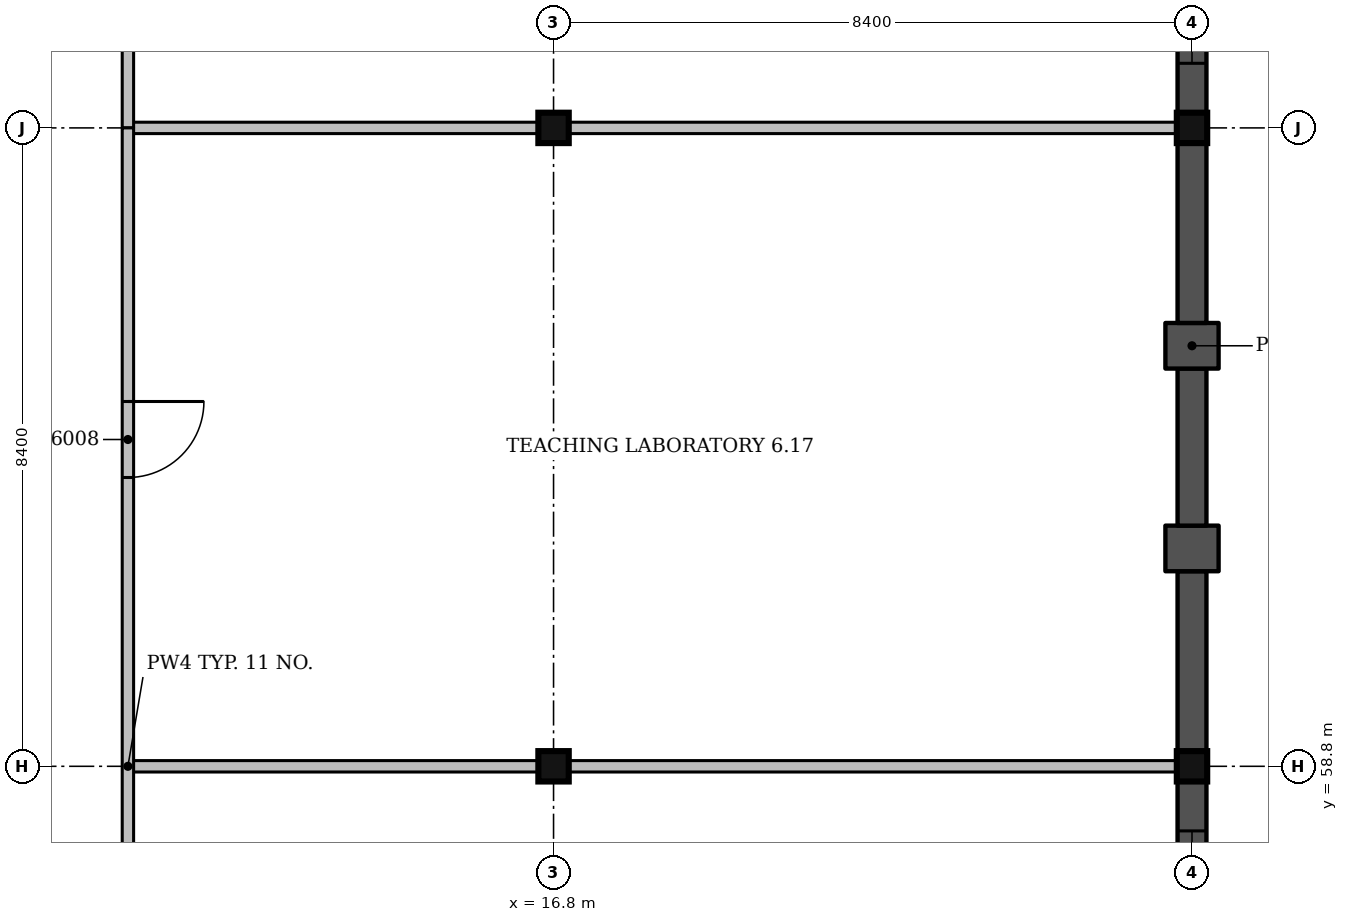
"""IFC4 building model, lengths in metres.
Left out: names, types, materials, properties, quantities, classifications, styles, units other than length and angle.
Written with IfcOpenShell. Run it as: python <this file> out.ifc"""

import sys

from ifc_helpers import new_model, si_unit, direction, frame, frame_2d, origin, origin_2d, place, context, subcontext, project, spatial, rectangle, extrude, element, fill, save


model = new_model("IFC4")
c1 = context("Model", 3, precision=1e-05, world=origin(), true_north=direction((0.0, 1.0)))
c2 = subcontext(c1, "Body", "Model", "MODEL_VIEW")
j1 = project(units=[si_unit("LENGTHUNIT", "METRE"), si_unit("PLANEANGLEUNIT", "RADIAN")], contexts=[c1])
p1 = place(None, origin())
s1 = spatial("IfcSite", under=j1, at=p1, CompositionType="ELEMENT")
p2 = place(p1, origin())
s2 = spatial("IfcBuilding", under=s1, at=p2, CompositionType="ELEMENT")
p3 = place(p2, frame((0.0, 0.0, 27.0)))
s3 = spatial("IfcBuildingStorey", under=s2, at=p3, CompositionType="ELEMENT", Elevation=27.0)
for number, where, z_axis, x_axis in (
    (1, (16.8, 58.8, 0.0), (0.0, 0.0, 1.0), (1.0, 0.0, 0.0)),
    (2, (16.8, 67.2, 0.0), (0.0, 0.0, 1.0), (1.0, 0.0, 0.0)),
    (3, (25.2, 58.8, 0.0), (0.0, 0.0, 1.0), (1.0, 0.0, 0.0)),
    (4, (25.2, 67.2, 0.0), (0.0, 0.0, 1.0), (1.0, 0.0, 0.0)),
):
    element("IfcColumn", number, at=place(p3, frame(where, z_axis=z_axis, x_axis=x_axis)), inside=s3, PredefinedType="COLUMN", context=c2, shape_type="SweptSolid", body=[
        extrude(rectangle(XDim=0.4, YDim=0.4, at=origin_2d()), origin(), (0.0, 0.0, 1.0), 4.5),
    ])
p4 = place(p3, frame((25.2, 54.9, 0.0), z_axis=(0.0, 0.0, 1.0), x_axis=(0.0, 1.0, 0.0)))
e5 = element("IfcWall", 5, at=p4, inside=s3, PredefinedType="SOLIDWALL", context=c2, shape_type="SweptSolid", body=[
    extrude(rectangle(XDim=3.7, YDim=0.38, at=frame_2d((1.85, 0.0))), origin(), (0.0, 0.0, 1.0), 4.2),
])
p5 = place(p4, frame((0.65, 0.0, 1.2)))
e6 = element("IfcOpeningElement", 6, at=p5, cuts=e5, PredefinedType="OPENING", context=c2, shape_type="SweptSolid", body=[
    extrude(rectangle(XDim=2.4, YDim=1.5, at=frame_2d((1.2, 0.75))), frame((0.0, 0.2, 0.0), z_axis=(0.0, -1.0, 0.0), x_axis=(1.0, 0.0, 0.0)), (0.0, 0.0, 1.0), 0.4),
])
p6 = place(p3, frame((25.2, 59.0, 0.0), z_axis=(0.0, 0.0, 1.0), x_axis=(0.0, 1.0, 0.0)))
e7 = element("IfcWall", 7, at=p6, inside=s3, PredefinedType="SOLIDWALL", context=c2, shape_type="SweptSolid", body=[
    extrude(rectangle(XDim=2.367, YDim=0.38, at=frame_2d((1.183, 0.0))), origin(), (0.0, 0.0, 1.0), 3.35),
])
p7 = place(p3, frame((25.2, 61.367, 0.0), z_axis=(0.0, 0.0, 1.0), x_axis=(0.0, 1.0, 0.0)))
e8 = element("IfcWall", 8, at=p7, inside=s3, PredefinedType="SOLIDWALL", context=c2, shape_type="SweptSolid", body=[
    extrude(rectangle(XDim=0.6, YDim=0.7, at=frame_2d((0.3, 0.0))), origin(), (0.0, 0.0, 1.0), 3.35),
])
p8 = place(p3, frame((25.2, 61.967, 0.0), z_axis=(0.0, 0.0, 1.0), x_axis=(0.0, 1.0, 0.0)))
e9 = element("IfcWall", 9, at=p8, inside=s3, PredefinedType="SOLIDWALL", context=c2, shape_type="SweptSolid", body=[
    extrude(rectangle(XDim=2.066, YDim=0.38, at=frame_2d((1.033, 0.0))), origin(), (0.0, 0.0, 1.0), 3.35),
])
p9 = place(p3, frame((25.2, 64.033, 0.0), z_axis=(0.0, 0.0, 1.0), x_axis=(0.0, 1.0, 0.0)))
e10 = element("IfcWall", 10, at=p9, inside=s3, PredefinedType="SOLIDWALL", context=c2, shape_type="SweptSolid", body=[
    extrude(rectangle(XDim=0.6, YDim=0.7, at=frame_2d((0.3, 0.0))), origin(), (0.0, 0.0, 1.0), 3.35),
])
p10 = place(p3, frame((25.2, 64.633, 0.0), z_axis=(0.0, 0.0, 1.0), x_axis=(0.0, 1.0, 0.0)))
e11 = element("IfcWall", 11, at=p10, inside=s3, PredefinedType="SOLIDWALL", context=c2, shape_type="SweptSolid", body=[
    extrude(rectangle(XDim=2.367, YDim=0.38, at=frame_2d((1.183, 0.0))), origin(), (0.0, 0.0, 1.0), 3.35),
])
p11 = place(p3, frame((25.2, 67.4, 0.0), z_axis=(0.0, 0.0, 1.0), x_axis=(0.0, 1.0, 0.0)))
e12 = element("IfcWall", 12, at=p11, inside=s3, PredefinedType="SOLIDWALL", context=c2, shape_type="SweptSolid", body=[
    extrude(rectangle(XDim=3.7, YDim=0.38, at=frame_2d((1.85, 0.0))), origin(), (0.0, 0.0, 1.0), 3.35),
])
p12 = place(p11, frame((0.65, 0.0, 1.2)))
e13 = element("IfcOpeningElement", 13, at=p12, cuts=e12, PredefinedType="OPENING", context=c2, shape_type="SweptSolid", body=[
    extrude(rectangle(XDim=2.4, YDim=1.5, at=frame_2d((1.2, 0.75))), frame((0.0, 0.2, 0.0), z_axis=(0.0, -1.0, 0.0), x_axis=(1.0, 0.0, 0.0)), (0.0, 0.0, 1.0), 0.4),
])
p13 = place(p3, frame((11.2, 58.8, 0.0), z_axis=(0.0, 0.0, 1.0), x_axis=(1.0, 0.0, 0.0)))
e14 = element("IfcWall", 14, at=p13, inside=s3, PredefinedType="PARTITIONING", context=c2, shape_type="SweptSolid", body=[
    extrude(rectangle(XDim=5.4, YDim=0.15, at=frame_2d((2.7, 0.0))), origin(), (0.0, 0.0, 1.0), 3.4),
])
p14 = place(p3, frame((17.0, 58.8, 0.0), z_axis=(0.0, 0.0, 1.0), x_axis=(1.0, 0.0, 0.0)))
e15 = element("IfcWall", 15, at=p14, inside=s3, PredefinedType="PARTITIONING", context=c2, shape_type="SweptSolid", body=[
    extrude(rectangle(XDim=8.0, YDim=0.15, at=frame_2d((4.0, 0.0))), origin(), (0.0, 0.0, 1.0), 3.35),
])
p15 = place(p3, frame((11.2, 67.2, 0.0), z_axis=(0.0, 0.0, 1.0), x_axis=(1.0, 0.0, 0.0)))
e16 = element("IfcWall", 16, at=p15, inside=s3, PredefinedType="PARTITIONING", context=c2, shape_type="SweptSolid", body=[
    extrude(rectangle(XDim=5.4, YDim=0.15, at=frame_2d((2.7, 0.0))), origin(), (0.0, 0.0, 1.0), 3.4),
])
p16 = place(p3, frame((17.0, 67.2, 0.0), z_axis=(0.0, 0.0, 1.0), x_axis=(1.0, 0.0, 0.0)))
e17 = element("IfcWall", 17, at=p16, inside=s3, PredefinedType="PARTITIONING", context=c2, shape_type="SweptSolid", body=[
    extrude(rectangle(XDim=8.0, YDim=0.15, at=frame_2d((4.0, 0.0))), origin(), (0.0, 0.0, 1.0), 3.35),
])
p17 = place(p3, frame((11.2, 67.2, 0.0), z_axis=(0.0, 0.0, 1.0), x_axis=(0.0, 1.0, 0.0)))
e18 = element("IfcWall", 18, at=p17, inside=s3, PredefinedType="PARTITIONING", context=c2, shape_type="SweptSolid", body=[
    extrude(rectangle(XDim=8.4, YDim=0.15, at=frame_2d((4.2, 0.0))), origin(), (0.0, 0.0, 1.0), 3.4),
])
p18 = place(p17, frame((3.8, 0.0, 0.0)))
e19 = element("IfcOpeningElement", 19, at=p18, cuts=e18, PredefinedType="OPENING", context=c2, shape_type="SweptSolid", body=[
    extrude(rectangle(XDim=0.9, YDim=2.1, at=frame_2d((0.45, 1.05))), frame((0.0, 0.085, 0.0), z_axis=(0.0, -1.0, 0.0), x_axis=(1.0, 0.0, 0.0)), (0.0, 0.0, 1.0), 0.17),
])
p19 = place(p3, frame((11.2, 50.4, 0.0), z_axis=(0.0, 0.0, 1.0), x_axis=(0.0, 1.0, 0.0)))
e20 = element("IfcWall", 20, at=p19, inside=s3, PredefinedType="PARTITIONING", context=c2, shape_type="SweptSolid", body=[
    extrude(rectangle(XDim=16.8, YDim=0.15, at=frame_2d((8.4, 0.0))), origin(), (0.0, 0.0, 1.0), 2.37),
])
p20 = place(p19, frame((3.8, 0.0, 0.0)))
e21 = element("IfcOpeningElement", 21, at=p20, cuts=e20, PredefinedType="OPENING", context=c2, shape_type="SweptSolid", body=[
    extrude(rectangle(XDim=1.0, YDim=2.1, at=frame_2d((0.5, 1.05))), frame((0.0, 0.085, 0.0), z_axis=(0.0, -1.0, 0.0), x_axis=(1.0, 0.0, 0.0)), (0.0, 0.0, 1.0), 0.17),
])
p21 = place(p19, frame((12.2, 0.0, 0.0)))
e22 = element("IfcOpeningElement", 22, at=p21, cuts=e20, PredefinedType="OPENING", context=c2, shape_type="SweptSolid", body=[
    extrude(rectangle(XDim=1.0, YDim=2.1, at=frame_2d((0.5, 1.05))), frame((0.0, 0.085, 0.0), z_axis=(0.0, -1.0, 0.0), x_axis=(1.0, 0.0, 0.0)), (0.0, 0.0, 1.0), 0.17),
])
p22 = place(p5, origin())
e23 = element("IfcWindow", 23, at=p22, inside=s3, PartitioningType="SINGLE_PANEL", PredefinedType="WINDOW", context=c2, shape_type="SweptSolid", body=[
    extrude(rectangle(XDim=2.4, YDim=1.5, at=frame_2d((1.2, 0.75))), frame((0.0, 0.15, 0.0), z_axis=(0.0, -1.0, 0.0), x_axis=(1.0, 0.0, 0.0)), (0.0, 0.0, 1.0), 0.06),
])
fill(e6, e23)
p23 = place(p12, origin())
e24 = element("IfcWindow", 24, at=p23, inside=s3, PartitioningType="SINGLE_PANEL", PredefinedType="WINDOW", context=c2, shape_type="SweptSolid", body=[
    extrude(rectangle(XDim=2.4, YDim=1.5, at=frame_2d((1.2, 0.75))), frame((0.0, 0.15, 0.0), z_axis=(0.0, -1.0, 0.0), x_axis=(1.0, 0.0, 0.0)), (0.0, 0.0, 1.0), 0.06),
])
fill(e13, e24)
p24 = place(p21, origin())
e25 = element("IfcDoor", 25, at=p24, inside=s3, OperationType="SINGLE_SWING_RIGHT", PredefinedType="DOOR", context=c2, shape_type="SweptSolid", body=[
    extrude(rectangle(XDim=1.0, YDim=2.1, at=frame_2d((0.5, 1.05))), frame((0.0, 0.025, 0.0), z_axis=(0.0, -1.0, 0.0), x_axis=(1.0, 0.0, 0.0)), (0.0, 0.0, 1.0), 0.05),
])
fill(e22, e25)
save(model, sys.argv[1])
